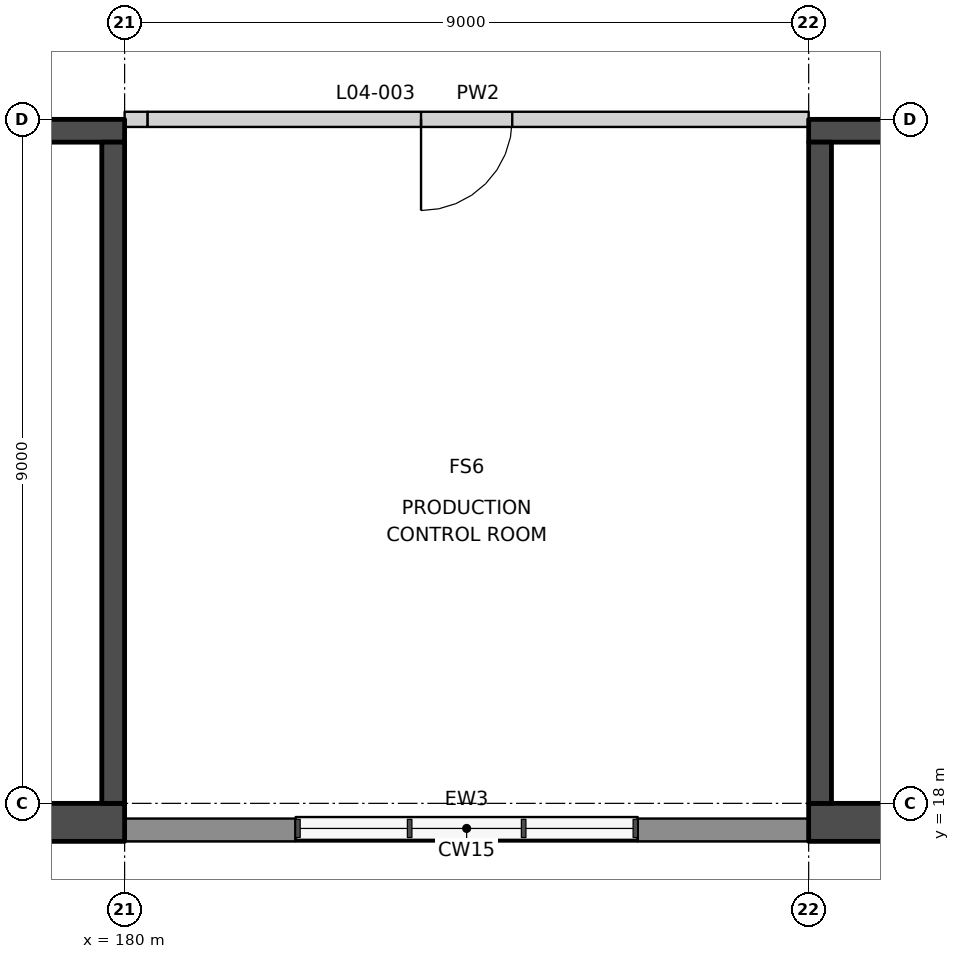
"""IFC4 building model, lengths in metres.
Left out: names, types, materials, properties, quantities, classifications, styles, units other than length and angle.
Written with IfcOpenShell. Run it as: python <this file> out.ifc"""

import sys

from ifc_helpers import new_model, si_unit, direction, frame, frame_2d, origin, place, context, subcontext, project, spatial, rectangle, extrude, element, fill, save


model = new_model("IFC4")
c1 = context("Model", 3, precision=1e-05, world=origin(), true_north=direction((0.0, 1.0)))
c2 = subcontext(c1, "Body", "Model", "MODEL_VIEW")
j1 = project(units=[si_unit("LENGTHUNIT", "METRE"), si_unit("PLANEANGLEUNIT", "RADIAN")], contexts=[c1])
p1 = place(None, origin())
s1 = spatial("IfcSite", under=j1, at=p1, CompositionType="ELEMENT")
p2 = place(p1, origin())
s2 = spatial("IfcBuilding", under=s1, at=p2, CompositionType="ELEMENT")
p3 = place(p2, frame((0.0, 0.0, 28.0)))
s3 = spatial("IfcBuildingStorey", under=s2, at=p3, CompositionType="ELEMENT", Elevation=28.0)
p4 = place(p3, frame((180.3, 27.0, 0.0), z_axis=(0.0, 0.0, 1.0), x_axis=(1.0, 0.0, 0.0)))
e1 = element("IfcWall", 1, at=p4, inside=s3, PredefinedType="PARTITIONING", context=c2, shape_type="SweptSolid", body=[
    extrude(rectangle(XDim=8.7, YDim=0.2, at=frame_2d((4.35, 0.0))), origin(), (0.0, 0.0, 1.0), 4.2),
])
p5 = place(p4, frame((3.6, 0.0, 0.0)))
e2 = element("IfcOpeningElement", 2, at=p5, cuts=e1, PredefinedType="OPENING", context=c2, shape_type="SweptSolid", body=[
    extrude(rectangle(XDim=1.2, YDim=2.1, at=frame_2d((0.6, 1.05))), frame((0.0, 0.11, 0.0), z_axis=(0.0, -1.0, 0.0), x_axis=(1.0, 0.0, 0.0)), (0.0, 0.0, 1.0), 0.22),
])
for number, where, z_axis, x_axis in (
    (3, (180.0, 17.65, 0.0), (0.0, 0.0, 1.0), (1.0, 0.0, 0.0)),
    (4, (186.75, 17.65, 0.0), (0.0, 0.0, 1.0), (1.0, 0.0, 0.0)),
):
    element("IfcWall", number, at=place(p3, frame(where, z_axis=z_axis, x_axis=x_axis)), inside=s3, PredefinedType="SOLIDWALL", context=c2, shape_type="SweptSolid", body=[
        extrude(rectangle(XDim=2.25, YDim=0.3, at=frame_2d((1.125, 0.0))), origin(), (0.0, 0.0, 1.0), 4.9),
    ])
p6 = place(p3, frame((182.25, 17.65, 0.0), z_axis=(0.0, 0.0, 1.0), x_axis=(1.0, 0.0, 0.0)))
e5 = element("IfcWall", 5, at=p6, inside=s3, PredefinedType="SOLIDWALL", context=c2, shape_type="SweptSolid", body=[
    extrude(rectangle(XDim=4.5, YDim=0.3, at=frame_2d((2.25, 0.0))), origin(), (0.0, 0.0, 1.0), 1.0),
])
p7 = place(p3, frame((180.0, 26.85, 0.0), z_axis=(0.0, 0.0, 1.0), x_axis=(-1.0, 0.0, 0.0)))
e6 = element("IfcWall", 6, at=p7, inside=s3, PredefinedType="SHEAR", context=c2, shape_type="SweptSolid", body=[
    extrude(rectangle(XDim=18.0, YDim=0.3, at=frame_2d((9.0, 0.0))), origin(), (0.0, 0.0, 1.0), 5.5),
])
p8 = place(p7, frame((8.6, 0.0, 0.0)))
e7 = element("IfcOpeningElement", 7, at=p8, cuts=e6, PredefinedType="OPENING", context=c2, shape_type="SweptSolid", body=[
    extrude(rectangle(XDim=1.2, YDim=2.1, at=frame_2d((0.6, 1.05))), frame((0.0, 0.16, 0.0), z_axis=(0.0, -1.0, 0.0), x_axis=(1.0, 0.0, 0.0)), (0.0, 0.0, 1.0), 0.32),
])
p9 = place(p3, frame((180.0, 17.75, 0.0), z_axis=(0.0, 0.0, 1.0), x_axis=(-1.0, 0.0, 0.0)))
e8 = element("IfcWall", 8, at=p9, inside=s3, PredefinedType="SHEAR", context=c2, shape_type="SweptSolid", body=[
    extrude(rectangle(XDim=18.0, YDim=0.5, at=frame_2d((9.0, 0.0))), origin(), (0.0, 0.0, 1.0), 5.5),
])
p10 = place(p3, frame((179.85, 26.7, 0.0), z_axis=(0.0, 0.0, 1.0), x_axis=(0.0, -1.0, 0.0)))
e9 = element("IfcWall", 9, at=p10, inside=s3, PredefinedType="SHEAR", context=c2, shape_type="SweptSolid", body=[
    extrude(rectangle(XDim=8.7, YDim=0.3, at=frame_2d((4.35, 0.0))), origin(), (0.0, 0.0, 1.0), 5.5),
])
p11 = place(p3, frame((189.0, 26.85, 0.0), z_axis=(0.0, 0.0, 1.0), x_axis=(1.0, 0.0, 0.0)))
e10 = element("IfcWall", 10, at=p11, inside=s3, PredefinedType="SHEAR", context=c2, shape_type="SweptSolid", body=[
    extrude(rectangle(XDim=18.0, YDim=0.3, at=frame_2d((9.0, 0.0))), origin(), (0.0, 0.0, 1.0), 5.5),
])
p12 = place(p11, frame((8.6, 0.0, 0.0)))
e11 = element("IfcOpeningElement", 11, at=p12, cuts=e10, PredefinedType="OPENING", context=c2, shape_type="SweptSolid", body=[
    extrude(rectangle(XDim=1.2, YDim=2.1, at=frame_2d((0.6, 1.05))), frame((0.0, 0.16, 0.0), z_axis=(0.0, -1.0, 0.0), x_axis=(1.0, 0.0, 0.0)), (0.0, 0.0, 1.0), 0.32),
])
p13 = place(p3, frame((189.0, 17.75, 0.0), z_axis=(0.0, 0.0, 1.0), x_axis=(1.0, 0.0, 0.0)))
e12 = element("IfcWall", 12, at=p13, inside=s3, PredefinedType="SHEAR", context=c2, shape_type="SweptSolid", body=[
    extrude(rectangle(XDim=18.0, YDim=0.5, at=frame_2d((9.0, 0.0))), origin(), (0.0, 0.0, 1.0), 5.5),
])
p14 = place(p3, frame((189.15, 26.7, 0.0), z_axis=(0.0, 0.0, 1.0), x_axis=(0.0, -1.0, 0.0)))
e13 = element("IfcWall", 13, at=p14, inside=s3, PredefinedType="SHEAR", context=c2, shape_type="SweptSolid", body=[
    extrude(rectangle(XDim=8.7, YDim=0.3, at=frame_2d((4.35, 0.0))), origin(), (0.0, 0.0, 1.0), 5.5),
])
p15 = place(p3, frame((180.0, 27.0, 0.0), z_axis=(0.0, 0.0, 1.0), x_axis=(1.0, 0.0, 0.0)))
e14 = element("IfcWall", 14, at=p15, inside=s3, PredefinedType="PARTITIONING", context=c2, shape_type="SweptSolid", body=[
    extrude(rectangle(XDim=0.3, YDim=0.2, at=frame_2d((0.15, 0.0))), origin(), (0.0, 0.0, 1.0), 5.5),
])
p16 = place(p5, frame((1.2, 0.0, 0.0), z_axis=(0.0, 0.0, 1.0), x_axis=(-1.0, 0.0, 0.0)))
e15 = element("IfcDoor", 15, at=p16, inside=s3, OperationType="SINGLE_SWING_RIGHT", PredefinedType="DOOR", context=c2, shape_type="SweptSolid", body=[
    extrude(rectangle(XDim=1.2, YDim=2.1, at=frame_2d((0.6, 1.05))), frame((0.0, 0.025, 0.0), z_axis=(0.0, -1.0, 0.0), x_axis=(1.0, 0.0, 0.0)), (0.0, 0.0, 1.0), 0.05),
])
fill(e2, e15)
save(model, sys.argv[1])
